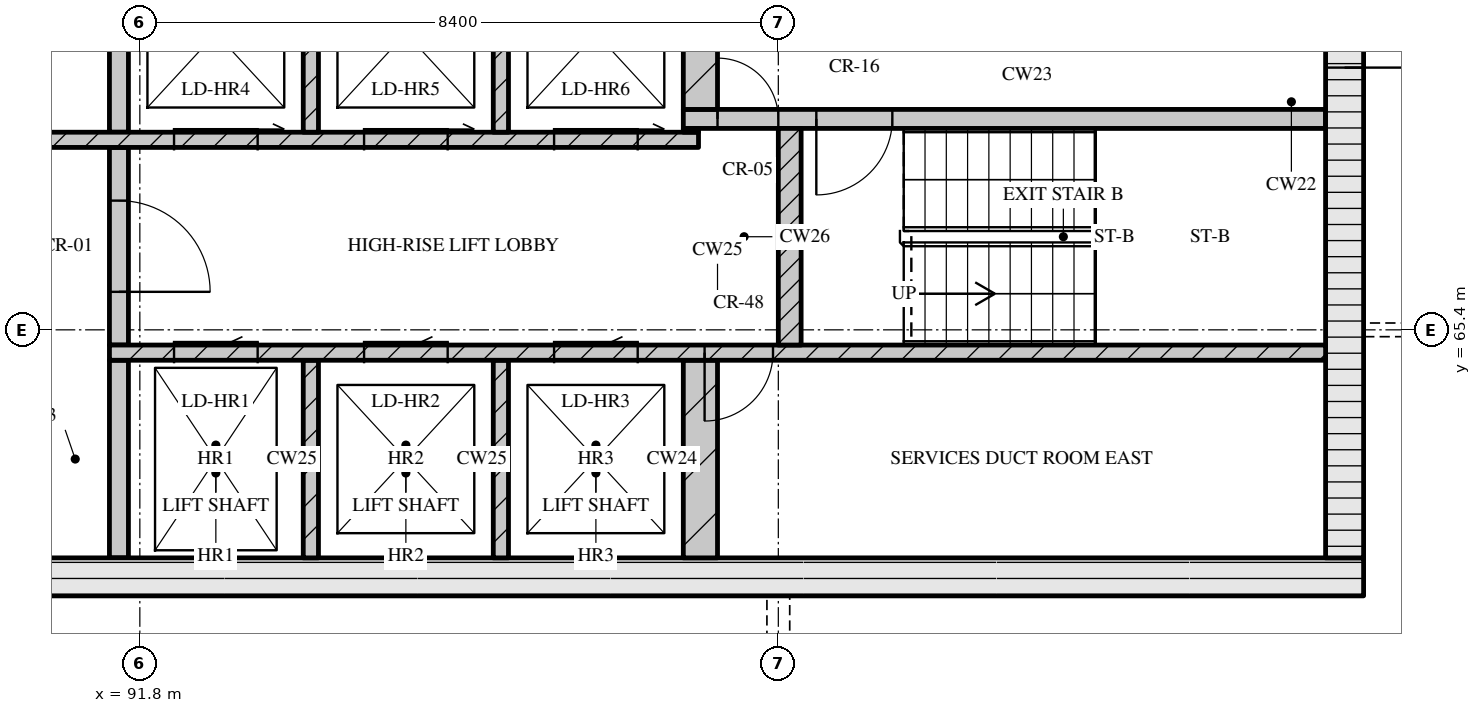
"""IFC4 building model, lengths in metres.
Left out: names, types, materials, properties, quantities, classifications, styles, units other than length and angle.
Written with IfcOpenShell. Run it as: python <this file> out.ifc"""

import sys

from ifc_helpers import new_model, si_unit, direction, frame, frame_2d, origin, place, context, subcontext, project, spatial, rectangle, extrude, element, fill, save


model = new_model("IFC4")
c1 = context("Model", 3, precision=1e-05, world=origin(), true_north=direction((0.0, 1.0)))
c2 = subcontext(c1, "Body", "Model", "MODEL_VIEW")
j1 = project(units=[si_unit("LENGTHUNIT", "METRE"), si_unit("PLANEANGLEUNIT", "RADIAN")], contexts=[c1])
p1 = place(None, origin())
s1 = spatial("IfcSite", under=j1, at=p1, CompositionType="ELEMENT")
p2 = place(p1, origin())
s2 = spatial("IfcBuilding", under=s1, at=p2, CompositionType="ELEMENT")
p3 = place(p2, frame((0.0, 0.0, 285.15)))
s3 = spatial("IfcBuildingStorey", under=s2, at=p3, CompositionType="ELEMENT", Elevation=285.15)
p4 = place(p3, frame((67.3, 62.15, 0.0), z_axis=(0.0, 0.0, 1.0), x_axis=(1.0, 0.0, 0.0)))
e1 = element("IfcWall", 1, at=p4, inside=s3, PredefinedType="SOLIDWALL", context=c2, shape_type="SweptSolid", body=[
    extrude(rectangle(XDim=40.6, YDim=0.5, at=frame_2d((20.3, 0.0))), origin(), (0.0, 0.0, 1.0), 3.32),
])
p5 = place(p4, frame((20.65, 0.0, 0.0)))
e2 = element("IfcOpeningElement", 2, at=p5, cuts=e1, PredefinedType="OPENING", context=c2, shape_type="SweptSolid", body=[
    extrude(rectangle(XDim=1.8, YDim=2.1, at=frame_2d((0.9, 1.05))), frame((0.0, 0.26, 0.0), z_axis=(0.0, -1.0, 0.0), x_axis=(1.0, 0.0, 0.0)), (0.0, 0.0, 1.0), 0.52),
])
p6 = place(p3, frame((107.65, 62.4, 0.0), z_axis=(0.0, 0.0, 1.0), x_axis=(0.0, 1.0, 0.0)))
e3 = element("IfcWall", 3, at=p6, inside=s3, PredefinedType="SOLIDWALL", context=c2, shape_type="SweptSolid", body=[
    extrude(rectangle(XDim=12.0, YDim=0.5, at=frame_2d((6.0, 0.0))), origin(), (0.0, 0.0, 1.0), 3.32),
])
p7 = place(p6, frame((6.45, 0.0, 0.0)))
e4 = element("IfcOpeningElement", 4, at=p7, cuts=e3, PredefinedType="OPENING", context=c2, shape_type="SweptSolid", body=[
    extrude(rectangle(XDim=1.2, YDim=2.1, at=frame_2d((0.6, 1.05))), frame((0.0, 0.26, 0.0), z_axis=(0.0, -1.0, 0.0), x_axis=(1.0, 0.0, 0.0)), (0.0, 0.0, 1.0), 0.52),
])
p8 = place(p3, frame((91.525, 62.4, 0.0), z_axis=(0.0, 0.0, 1.0), x_axis=(0.0, 1.0, 0.0)))
e5 = element("IfcWall", 5, at=p8, inside=s3, PredefinedType="SOLIDWALL", context=c2, shape_type="SweptSolid", body=[
    extrude(rectangle(XDim=2.6, YDim=0.25, at=frame_2d((1.3, 0.0))), origin(), (0.0, 0.0, 1.0), 3.32),
])
for number, where, z_axis, x_axis in (
    (6, (94.05, 62.4, 0.0), (0.0, 0.0, 1.0), (0.0, 1.0, 0.0)),
    (7, (96.55, 62.4, 0.0), (0.0, 0.0, 1.0), (0.0, 1.0, 0.0)),
):
    element("IfcWall", number, at=place(p3, frame(where, z_axis=z_axis, x_axis=x_axis)), inside=s3, PredefinedType="SOLIDWALL", context=c2, shape_type="SweptSolid", body=[
        extrude(rectangle(XDim=2.6, YDim=0.2, at=frame_2d((1.3, 0.0))), origin(), (0.0, 0.0, 1.0), 3.32),
    ])
p9 = place(p3, frame((99.175, 62.4, 0.0), z_axis=(0.0, 0.0, 1.0), x_axis=(0.0, 1.0, 0.0)))
e8 = element("IfcWall", 8, at=p9, inside=s3, PredefinedType="SOLIDWALL", context=c2, shape_type="SweptSolid", body=[
    extrude(rectangle(XDim=2.6, YDim=0.45, at=frame_2d((1.3, 0.0))), origin(), (0.0, 0.0, 1.0), 3.32),
])
p10 = place(p3, frame((91.4, 65.1, 0.0), z_axis=(0.0, 0.0, 1.0), x_axis=(1.0, 0.0, 0.0)))
e9 = element("IfcWall", 9, at=p10, inside=s3, PredefinedType="SOLIDWALL", context=c2, shape_type="SweptSolid", body=[
    extrude(rectangle(XDim=16.0, YDim=0.2, at=frame_2d((8.0, 0.0))), origin(), (0.0, 0.0, 1.0), 3.32),
])
p11 = place(p10, frame((0.85, 0.0, 0.0)))
e10 = element("IfcOpeningElement", 10, at=p11, cuts=e9, PredefinedType="OPENING", context=c2, shape_type="SweptSolid", body=[
    extrude(rectangle(XDim=1.1, YDim=2.1, at=frame_2d((0.55, 1.05))), frame((0.0, 0.11, 0.0), z_axis=(0.0, -1.0, 0.0), x_axis=(1.0, 0.0, 0.0)), (0.0, 0.0, 1.0), 0.22),
])
p12 = place(p10, frame((3.35, 0.0, 0.0)))
e11 = element("IfcOpeningElement", 11, at=p12, cuts=e9, PredefinedType="OPENING", context=c2, shape_type="SweptSolid", body=[
    extrude(rectangle(XDim=1.1, YDim=2.1, at=frame_2d((0.55, 1.05))), frame((0.0, 0.11, 0.0), z_axis=(0.0, -1.0, 0.0), x_axis=(1.0, 0.0, 0.0)), (0.0, 0.0, 1.0), 0.22),
])
p13 = place(p10, frame((5.85, 0.0, 0.0)))
e12 = element("IfcOpeningElement", 12, at=p13, cuts=e9, PredefinedType="OPENING", context=c2, shape_type="SweptSolid", body=[
    extrude(rectangle(XDim=1.1, YDim=2.1, at=frame_2d((0.55, 1.05))), frame((0.0, 0.11, 0.0), z_axis=(0.0, -1.0, 0.0), x_axis=(1.0, 0.0, 0.0)), (0.0, 0.0, 1.0), 0.22),
])
p14 = place(p10, frame((7.83, 0.0, 0.0)))
e13 = element("IfcOpeningElement", 13, at=p14, cuts=e9, PredefinedType="OPENING", context=c2, shape_type="SweptSolid", body=[
    extrude(rectangle(XDim=0.9, YDim=2.1, at=frame_2d((0.45, 1.05))), frame((0.0, 0.11, 0.0), z_axis=(0.0, -1.0, 0.0), x_axis=(1.0, 0.0, 0.0)), (0.0, 0.0, 1.0), 0.22),
])
p15 = place(p3, frame((91.525, 65.2, 0.0), z_axis=(0.0, 0.0, 1.0), x_axis=(0.0, 1.0, 0.0)))
e14 = element("IfcWall", 14, at=p15, inside=s3, PredefinedType="SOLIDWALL", context=c2, shape_type="SweptSolid", body=[
    extrude(rectangle(XDim=2.6, YDim=0.25, at=frame_2d((1.3, 0.0))), origin(), (0.0, 0.0, 1.0), 3.32),
])
p16 = place(p15, frame((0.7, 0.0, 0.0)))
e15 = element("IfcOpeningElement", 15, at=p16, cuts=e14, PredefinedType="OPENING", context=c2, shape_type="SweptSolid", body=[
    extrude(rectangle(XDim=1.2, YDim=2.1, at=frame_2d((0.6, 1.05))), frame((0.0, 0.135, 0.0), z_axis=(0.0, -1.0, 0.0), x_axis=(1.0, 0.0, 0.0)), (0.0, 0.0, 1.0), 0.27),
])
p17 = place(p3, frame((100.35, 65.2, 0.0), z_axis=(0.0, 0.0, 1.0), x_axis=(0.0, 1.0, 0.0)))
e16 = element("IfcWall", 16, at=p17, inside=s3, PredefinedType="SOLIDWALL", context=c2, shape_type="SweptSolid", body=[
    extrude(rectangle(XDim=2.85, YDim=0.3, at=frame_2d((1.425, 0.0))), origin(), (0.0, 0.0, 1.0), 3.32),
])
p18 = place(p3, frame((76.05, 67.9, 0.0), z_axis=(0.0, 0.0, 1.0), x_axis=(1.0, 0.0, 0.0)))
e17 = element("IfcWall", 17, at=p18, inside=s3, PredefinedType="SOLIDWALL", context=c2, shape_type="SweptSolid", body=[
    extrude(rectangle(XDim=23.1, YDim=0.2, at=frame_2d((11.55, 0.0))), origin(), (0.0, 0.0, 1.0), 3.32),
])
p19 = place(p18, frame((0.75, 0.0, 0.0)))
e18 = element("IfcOpeningElement", 18, at=p19, cuts=e17, PredefinedType="OPENING", context=c2, shape_type="SweptSolid", body=[
    extrude(rectangle(XDim=0.9, YDim=2.1, at=frame_2d((0.45, 1.05))), frame((0.0, 0.11, 0.0), z_axis=(0.0, -1.0, 0.0), x_axis=(1.0, 0.0, 0.0)), (0.0, 0.0, 1.0), 0.22),
])
p20 = place(p18, frame((3.32, 0.0, 0.0)))
e19 = element("IfcOpeningElement", 19, at=p20, cuts=e17, PredefinedType="OPENING", context=c2, shape_type="SweptSolid", body=[
    extrude(rectangle(XDim=0.9, YDim=2.1, at=frame_2d((0.45, 1.05))), frame((0.0, 0.11, 0.0), z_axis=(0.0, -1.0, 0.0), x_axis=(1.0, 0.0, 0.0)), (0.0, 0.0, 1.0), 0.22),
])
p21 = place(p18, frame((5.77, 0.0, 0.0)))
e20 = element("IfcOpeningElement", 20, at=p21, cuts=e17, PredefinedType="OPENING", context=c2, shape_type="SweptSolid", body=[
    extrude(rectangle(XDim=0.9, YDim=2.1, at=frame_2d((0.45, 1.05))), frame((0.0, 0.11, 0.0), z_axis=(0.0, -1.0, 0.0), x_axis=(1.0, 0.0, 0.0)), (0.0, 0.0, 1.0), 0.22),
])
p22 = place(p18, frame((8.45, 0.0, 0.0)))
e21 = element("IfcOpeningElement", 21, at=p22, cuts=e17, PredefinedType="OPENING", context=c2, shape_type="SweptSolid", body=[
    extrude(rectangle(XDim=0.9, YDim=2.1, at=frame_2d((0.45, 1.05))), frame((0.0, 0.11, 0.0), z_axis=(0.0, -1.0, 0.0), x_axis=(1.0, 0.0, 0.0)), (0.0, 0.0, 1.0), 0.22),
])
p23 = place(p18, frame((10.91, 0.0, 0.0)))
e22 = element("IfcOpeningElement", 22, at=p23, cuts=e17, PredefinedType="OPENING", context=c2, shape_type="SweptSolid", body=[
    extrude(rectangle(XDim=0.9, YDim=2.1, at=frame_2d((0.45, 1.05))), frame((0.0, 0.11, 0.0), z_axis=(0.0, -1.0, 0.0), x_axis=(1.0, 0.0, 0.0)), (0.0, 0.0, 1.0), 0.22),
])
p24 = place(p18, frame((13.55, 0.0, 0.0)))
e23 = element("IfcOpeningElement", 23, at=p24, cuts=e17, PredefinedType="OPENING", context=c2, shape_type="SweptSolid", body=[
    extrude(rectangle(XDim=1.0, YDim=2.1, at=frame_2d((0.5, 1.05))), frame((0.0, 0.11, 0.0), z_axis=(0.0, -1.0, 0.0), x_axis=(1.0, 0.0, 0.0)), (0.0, 0.0, 1.0), 0.22),
])
p25 = place(p18, frame((16.2, 0.0, 0.0)))
e24 = element("IfcOpeningElement", 24, at=p25, cuts=e17, PredefinedType="OPENING", context=c2, shape_type="SweptSolid", body=[
    extrude(rectangle(XDim=1.1, YDim=2.1, at=frame_2d((0.55, 1.05))), frame((0.0, 0.11, 0.0), z_axis=(0.0, -1.0, 0.0), x_axis=(1.0, 0.0, 0.0)), (0.0, 0.0, 1.0), 0.22),
])
p26 = place(p18, frame((18.7, 0.0, 0.0)))
e25 = element("IfcOpeningElement", 25, at=p26, cuts=e17, PredefinedType="OPENING", context=c2, shape_type="SweptSolid", body=[
    extrude(rectangle(XDim=1.1, YDim=2.1, at=frame_2d((0.55, 1.05))), frame((0.0, 0.11, 0.0), z_axis=(0.0, -1.0, 0.0), x_axis=(1.0, 0.0, 0.0)), (0.0, 0.0, 1.0), 0.22),
])
p27 = place(p18, frame((21.2, 0.0, 0.0)))
e26 = element("IfcOpeningElement", 26, at=p27, cuts=e17, PredefinedType="OPENING", context=c2, shape_type="SweptSolid", body=[
    extrude(rectangle(XDim=1.1, YDim=2.1, at=frame_2d((0.55, 1.05))), frame((0.0, 0.11, 0.0), z_axis=(0.0, -1.0, 0.0), x_axis=(1.0, 0.0, 0.0)), (0.0, 0.0, 1.0), 0.22),
])
p28 = place(p3, frame((91.525, 68.0, 0.0), z_axis=(0.0, 0.0, 1.0), x_axis=(0.0, 1.0, 0.0)))
e27 = element("IfcWall", 27, at=p28, inside=s3, PredefinedType="SOLIDWALL", context=c2, shape_type="SweptSolid", body=[
    extrude(rectangle(XDim=2.6, YDim=0.25, at=frame_2d((1.3, 0.0))), origin(), (0.0, 0.0, 1.0), 3.32),
])
for number, where, z_axis, x_axis in (
    (28, (94.05, 68.0, 0.0), (0.0, 0.0, 1.0), (0.0, 1.0, 0.0)),
    (29, (96.55, 68.0, 0.0), (0.0, 0.0, 1.0), (0.0, 1.0, 0.0)),
):
    element("IfcWall", number, at=place(p3, frame(where, z_axis=z_axis, x_axis=x_axis)), inside=s3, PredefinedType="SOLIDWALL", context=c2, shape_type="SweptSolid", body=[
        extrude(rectangle(XDim=2.6, YDim=0.2, at=frame_2d((1.3, 0.0))), origin(), (0.0, 0.0, 1.0), 3.32),
    ])
p29 = place(p3, frame((98.95, 68.025, 0.0), z_axis=(0.0, 0.0, 1.0), x_axis=(1.0, 0.0, 0.0)))
e30 = element("IfcWall", 30, at=p29, inside=s3, PredefinedType="SOLIDWALL", context=c2, shape_type="SweptSolid", body=[
    extrude(rectangle(XDim=0.2, YDim=0.05, at=frame_2d((0.1, 0.0))), origin(), (0.0, 0.0, 1.0), 3.32),
])
p30 = place(p3, frame((98.95, 68.175, 0.0), z_axis=(0.0, 0.0, 1.0), x_axis=(1.0, 0.0, 0.0)))
e31 = element("IfcWall", 31, at=p30, inside=s3, PredefinedType="SOLIDWALL", context=c2, shape_type="SweptSolid", body=[
    extrude(rectangle(XDim=8.45, YDim=0.25, at=frame_2d((4.225, 0.0))), origin(), (0.0, 0.0, 1.0), 3.32),
])
p31 = place(p30, frame((0.45, 0.0, 0.0)))
e32 = element("IfcOpeningElement", 32, at=p31, cuts=e31, PredefinedType="OPENING", context=c2, shape_type="SweptSolid", body=[
    extrude(rectangle(XDim=0.8, YDim=2.1, at=frame_2d((0.4, 1.05))), frame((0.0, 0.135, 0.0), z_axis=(0.0, -1.0, 0.0), x_axis=(1.0, 0.0, 0.0)), (0.0, 0.0, 1.0), 0.27),
])
p32 = place(p30, frame((1.75, 0.0, 0.0)))
e33 = element("IfcOpeningElement", 33, at=p32, cuts=e31, PredefinedType="OPENING", context=c2, shape_type="SweptSolid", body=[
    extrude(rectangle(XDim=1.0, YDim=2.1, at=frame_2d((0.5, 1.05))), frame((0.0, 0.135, 0.0), z_axis=(0.0, -1.0, 0.0), x_axis=(1.0, 0.0, 0.0)), (0.0, 0.0, 1.0), 0.27),
])
p33 = place(p3, frame((99.175, 68.3, 0.0), z_axis=(0.0, 0.0, 1.0), x_axis=(0.0, 1.0, 0.0)))
e34 = element("IfcWall", 34, at=p33, inside=s3, PredefinedType="SOLIDWALL", context=c2, shape_type="SweptSolid", body=[
    extrude(rectangle(XDim=2.3, YDim=0.45, at=frame_2d((1.15, 0.0))), origin(), (0.0, 0.0, 1.0), 3.32),
])
p34 = place(p11, origin())
e35 = element("IfcDoor", 35, at=p34, inside=s3, OperationType="SLIDING_TO_LEFT", PredefinedType="DOOR", context=c2, shape_type="SweptSolid", body=[
    extrude(rectangle(XDim=1.1, YDim=2.1, at=frame_2d((0.55, 1.05))), frame((0.0, 0.025, 0.0), z_axis=(0.0, -1.0, 0.0), x_axis=(1.0, 0.0, 0.0)), (0.0, 0.0, 1.0), 0.05),
])
fill(e10, e35)
p35 = place(p12, origin())
e36 = element("IfcDoor", 36, at=p35, inside=s3, OperationType="SLIDING_TO_LEFT", PredefinedType="DOOR", context=c2, shape_type="SweptSolid", body=[
    extrude(rectangle(XDim=1.1, YDim=2.1, at=frame_2d((0.55, 1.05))), frame((0.0, 0.025, 0.0), z_axis=(0.0, -1.0, 0.0), x_axis=(1.0, 0.0, 0.0)), (0.0, 0.0, 1.0), 0.05),
])
fill(e11, e36)
p36 = place(p13, origin())
e37 = element("IfcDoor", 37, at=p36, inside=s3, OperationType="SLIDING_TO_LEFT", PredefinedType="DOOR", context=c2, shape_type="SweptSolid", body=[
    extrude(rectangle(XDim=1.1, YDim=2.1, at=frame_2d((0.55, 1.05))), frame((0.0, 0.025, 0.0), z_axis=(0.0, -1.0, 0.0), x_axis=(1.0, 0.0, 0.0)), (0.0, 0.0, 1.0), 0.05),
])
fill(e12, e37)
p37 = place(p14, origin())
e38 = element("IfcDoor", 38, at=p37, inside=s3, OperationType="SINGLE_SWING_RIGHT", PredefinedType="DOOR", context=c2, shape_type="SweptSolid", body=[
    extrude(rectangle(XDim=0.9, YDim=2.1, at=frame_2d((0.45, 1.05))), frame((0.0, 0.025, 0.0), z_axis=(0.0, -1.0, 0.0), x_axis=(1.0, 0.0, 0.0)), (0.0, 0.0, 1.0), 0.05),
])
fill(e13, e38)
p38 = place(p16, origin())
e39 = element("IfcDoor", 39, at=p38, inside=s3, OperationType="SINGLE_SWING_RIGHT", PredefinedType="DOOR", context=c2, shape_type="SweptSolid", body=[
    extrude(rectangle(XDim=1.2, YDim=2.1, at=frame_2d((0.6, 1.05))), frame((0.0, 0.025, 0.0), z_axis=(0.0, -1.0, 0.0), x_axis=(1.0, 0.0, 0.0)), (0.0, 0.0, 1.0), 0.05),
])
fill(e15, e39)
p39 = place(p25, origin())
e40 = element("IfcDoor", 40, at=p39, inside=s3, OperationType="SLIDING_TO_RIGHT", PredefinedType="DOOR", context=c2, shape_type="SweptSolid", body=[
    extrude(rectangle(XDim=1.1, YDim=2.1, at=frame_2d((0.55, 1.05))), frame((0.0, 0.025, 0.0), z_axis=(0.0, -1.0, 0.0), x_axis=(1.0, 0.0, 0.0)), (0.0, 0.0, 1.0), 0.05),
])
fill(e24, e40)
p40 = place(p26, origin())
e41 = element("IfcDoor", 41, at=p40, inside=s3, OperationType="SLIDING_TO_RIGHT", PredefinedType="DOOR", context=c2, shape_type="SweptSolid", body=[
    extrude(rectangle(XDim=1.1, YDim=2.1, at=frame_2d((0.55, 1.05))), frame((0.0, 0.025, 0.0), z_axis=(0.0, -1.0, 0.0), x_axis=(1.0, 0.0, 0.0)), (0.0, 0.0, 1.0), 0.05),
])
fill(e25, e41)
p41 = place(p27, origin())
e42 = element("IfcDoor", 42, at=p41, inside=s3, OperationType="SLIDING_TO_RIGHT", PredefinedType="DOOR", context=c2, shape_type="SweptSolid", body=[
    extrude(rectangle(XDim=1.1, YDim=2.1, at=frame_2d((0.55, 1.05))), frame((0.0, 0.025, 0.0), z_axis=(0.0, -1.0, 0.0), x_axis=(1.0, 0.0, 0.0)), (0.0, 0.0, 1.0), 0.05),
])
fill(e26, e42)
p42 = place(p31, origin())
e43 = element("IfcDoor", 43, at=p42, inside=s3, OperationType="SINGLE_SWING_LEFT", PredefinedType="DOOR", context=c2, shape_type="SweptSolid", body=[
    extrude(rectangle(XDim=0.8, YDim=2.1, at=frame_2d((0.4, 1.05))), frame((0.0, 0.025, 0.0), z_axis=(0.0, -1.0, 0.0), x_axis=(1.0, 0.0, 0.0)), (0.0, 0.0, 1.0), 0.05),
])
fill(e32, e43)
p43 = place(p32, origin())
e44 = element("IfcDoor", 44, at=p43, inside=s3, OperationType="SINGLE_SWING_RIGHT", PredefinedType="DOOR", context=c2, shape_type="SweptSolid", body=[
    extrude(rectangle(XDim=1.0, YDim=2.1, at=frame_2d((0.5, 1.05))), frame((0.0, 0.025, 0.0), z_axis=(0.0, -1.0, 0.0), x_axis=(1.0, 0.0, 0.0)), (0.0, 0.0, 1.0), 0.05),
])
fill(e33, e44)
p44 = place(p7, origin())
e45 = element("IfcDoor", 45, at=p44, inside=s3, OperationType="SINGLE_SWING_RIGHT", PredefinedType="DOOR", context=c2, shape_type="SweptSolid", body=[
    extrude(rectangle(XDim=1.2, YDim=2.1, at=frame_2d((0.6, 1.05))), frame((0.0, 0.025, 0.0), z_axis=(0.0, -1.0, 0.0), x_axis=(1.0, 0.0, 0.0)), (0.0, 0.0, 1.0), 0.05),
])
fill(e4, e45)
save(model, sys.argv[1])
